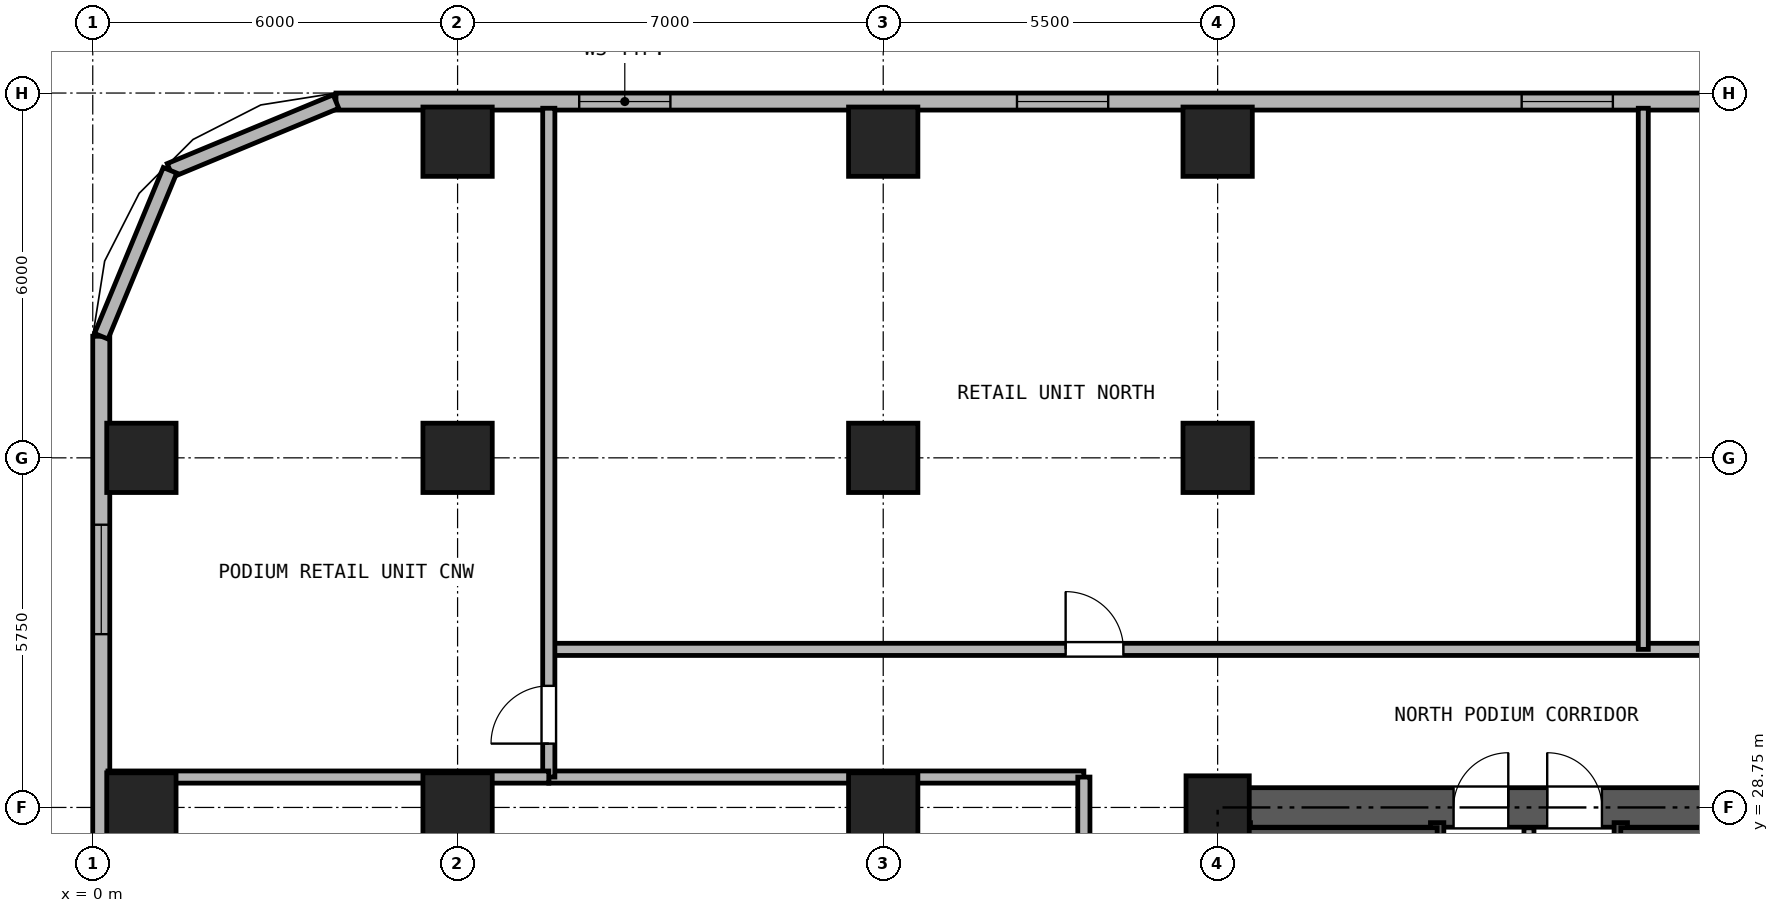
"""IFC4 building model, lengths in metres.
Left out: names, types, materials, properties, quantities, classifications, styles, units other than length and angle.
Written with IfcOpenShell. Run it as: python <this file> out.ifc"""

import sys

from ifc_helpers import new_model, si_unit, direction, frame, frame_2d, origin, origin_2d, place, context, subcontext, project, spatial, rectangle, hollow_rectangle, extrude, source, transform, mapped, element, fill, save


model = new_model("IFC4")
c1 = context("Model", 3, precision=1e-05, world=origin(), true_north=direction((0.0, 1.0)))
c2 = subcontext(c1, "Body", "Model", "MODEL_VIEW")
j1 = project(units=[si_unit("LENGTHUNIT", "METRE"), si_unit("PLANEANGLEUNIT", "RADIAN")], contexts=[c1])
p1 = place(None, origin())
s1 = spatial("IfcSite", under=j1, at=p1, CompositionType="ELEMENT")
p2 = place(p1, origin())
s2 = spatial("IfcBuilding", under=s1, at=p2, CompositionType="ELEMENT")
p3 = place(p2, frame((0.0, 0.0, 9.0)))
s3 = spatial("IfcBuildingStorey", under=s2, at=p3, CompositionType="ELEMENT", Elevation=9.0)
m1 = source(origin(), c2, "Body", "SweptSolid", [
    extrude(hollow_rectangle(XDim=1.14, YDim=1.14, WallThickness=0.07, at=origin_2d()), origin(), (0.0, 0.0, 1.0), 4.18),
])
for number, where, z_axis, x_axis in (
    (1, (6.0, 39.7, 0.0), (0.0, 0.0, 1.0), (1.0, 0.0, 0.0)),
    (2, (13.0, 39.7, 0.0), (0.0, 0.0, 1.0), (1.0, 0.0, 0.0)),
    (3, (18.5, 39.7, 0.0), (0.0, 0.0, 1.0), (1.0, 0.0, 0.0)),
    (4, (0.8, 28.75, 0.0), (0.0, 0.0, 1.0), (1.0, 0.0, 0.0)),
    (5, (0.8, 34.5, 0.0), (0.0, 0.0, 1.0), (1.0, 0.0, 0.0)),
    (6, (6.0, 28.75, 0.0), (0.0, 0.0, 1.0), (1.0, 0.0, 0.0)),
    (7, (6.0, 34.5, 0.0), (0.0, 0.0, 1.0), (1.0, 0.0, 0.0)),
    (8, (13.0, 28.75, 0.0), (0.0, 0.0, 1.0), (1.0, 0.0, 0.0)),
    (9, (13.0, 34.5, 0.0), (0.0, 0.0, 1.0), (1.0, 0.0, 0.0)),
):
    element("IfcColumn", number, at=place(p3, frame(where, z_axis=z_axis, x_axis=x_axis)), inside=s3, PredefinedType="COLUMN", context=c2, shape_type="MappedRepresentation", body=[
        mapped(m1, transform((0.0, 0.0, 0.0), x_axis=(1.0, 0.0, 0.0), y_axis=(0.0, 1.0, 0.0), z_axis=(0.0, 0.0, 1.0), scale=1.0)),
    ])
m2 = source(origin(), c2, "Body", "SweptSolid", [
    extrude(hollow_rectangle(XDim=1.04, YDim=1.04, WallThickness=0.065, at=origin_2d()), origin(), (0.0, 0.0, 1.0), 4.18),
])
p4 = place(p3, frame((18.5, 28.75, 0.0), z_axis=(0.0, 0.0, 1.0), x_axis=(1.0, 0.0, 0.0)))
e10 = element("IfcColumn", 10, at=p4, inside=s3, PredefinedType="COLUMN", context=c2, shape_type="MappedRepresentation", body=[
    mapped(m2, transform((0.0, 0.0, 0.0), x_axis=(1.0, 0.0, 0.0), y_axis=(0.0, 1.0, 0.0), z_axis=(0.0, 0.0, 1.0), scale=1.0)),
])
p5 = place(p3, frame((18.5, 34.5, 0.0), z_axis=(0.0, 0.0, 1.0), x_axis=(1.0, 0.0, 0.0)))
e11 = element("IfcColumn", 11, at=p5, inside=s3, PredefinedType="COLUMN", context=c2, shape_type="MappedRepresentation", body=[
    mapped(m1, transform((0.0, 0.0, 0.0), x_axis=(1.0, 0.0, 0.0), y_axis=(0.0, 1.0, 0.0), z_axis=(0.0, 0.0, 1.0), scale=1.0)),
])
p6 = place(p3, frame((0.14, 4.0, 0.0), z_axis=(0.0, 0.0, 1.0), x_axis=(0.0, 1.0, 0.0)))
e12 = element("IfcWall", 12, at=p6, inside=s3, PredefinedType="SOLIDWALL", context=c2, shape_type="SweptSolid", body=[
    extrude(rectangle(XDim=32.5, YDim=0.28, at=frame_2d((16.25, 0.0))), origin(), (0.0, 0.0, 1.0), 4.18),
])
p7 = place(p6, frame((3.6, 0.0, 0.9)))
e13 = element("IfcOpeningElement", 13, at=p7, cuts=e12, PredefinedType="OPENING", context=c2, shape_type="SweptSolid", body=[
    extrude(rectangle(XDim=1.8, YDim=2.1, at=frame_2d((0.9, 1.05))), frame((0.0, 0.15, 0.0), z_axis=(0.0, -1.0, 0.0), x_axis=(1.0, 0.0, 0.0)), (0.0, 0.0, 1.0), 0.3),
])
p8 = place(p6, frame((9.8, 0.0, 0.9)))
e14 = element("IfcOpeningElement", 14, at=p8, cuts=e12, PredefinedType="OPENING", context=c2, shape_type="SweptSolid", body=[
    extrude(rectangle(XDim=1.8, YDim=2.1, at=frame_2d((0.9, 1.05))), frame((0.0, 0.15, 0.0), z_axis=(0.0, -1.0, 0.0), x_axis=(1.0, 0.0, 0.0)), (0.0, 0.0, 1.0), 0.3),
])
p9 = place(p6, frame((15.8, 0.0, 0.9)))
e15 = element("IfcOpeningElement", 15, at=p9, cuts=e12, PredefinedType="OPENING", context=c2, shape_type="SweptSolid", body=[
    extrude(rectangle(XDim=1.8, YDim=2.1, at=frame_2d((0.9, 1.05))), frame((0.0, 0.15, 0.0), z_axis=(0.0, -1.0, 0.0), x_axis=(1.0, 0.0, 0.0)), (0.0, 0.0, 1.0), 0.3),
])
p10 = place(p6, frame((21.6, 0.0, 0.9)))
e16 = element("IfcOpeningElement", 16, at=p10, cuts=e12, PredefinedType="OPENING", context=c2, shape_type="SweptSolid", body=[
    extrude(rectangle(XDim=1.8, YDim=2.1, at=frame_2d((0.9, 1.05))), frame((0.0, 0.15, 0.0), z_axis=(0.0, -1.0, 0.0), x_axis=(1.0, 0.0, 0.0)), (0.0, 0.0, 1.0), 0.3),
])
p11 = place(p6, frame((27.6, 0.0, 0.9)))
e17 = element("IfcOpeningElement", 17, at=p11, cuts=e12, PredefinedType="OPENING", context=c2, shape_type="SweptSolid", body=[
    extrude(rectangle(XDim=1.8, YDim=2.1, at=frame_2d((0.9, 1.05))), frame((0.0, 0.15, 0.0), z_axis=(0.0, -1.0, 0.0), x_axis=(1.0, 0.0, 0.0)), (0.0, 0.0, 1.0), 0.3),
])
p12 = place(p3, frame((4.0, 40.36, 0.0), z_axis=(0.0, 0.0, 1.0), x_axis=(1.0, 0.0, 0.0)))
e18 = element("IfcWall", 18, at=p12, inside=s3, PredefinedType="SOLIDWALL", context=c2, shape_type="SweptSolid", body=[
    extrude(rectangle(XDim=39.0, YDim=0.28, at=frame_2d((19.5, 0.0))), origin(), (0.0, 0.0, 1.0), 4.18),
])
p13 = place(p12, frame((4.0, 0.0, 0.9)))
e19 = element("IfcOpeningElement", 19, at=p13, cuts=e18, PredefinedType="OPENING", context=c2, shape_type="SweptSolid", body=[
    extrude(rectangle(XDim=1.5, YDim=1.8, at=frame_2d((0.75, 0.9))), frame((0.0, 0.15, 0.0), z_axis=(0.0, -1.0, 0.0), x_axis=(1.0, 0.0, 0.0)), (0.0, 0.0, 1.0), 0.3),
])
p14 = place(p12, frame((11.2, 0.0, 0.9)))
e20 = element("IfcOpeningElement", 20, at=p14, cuts=e18, PredefinedType="OPENING", context=c2, shape_type="SweptSolid", body=[
    extrude(rectangle(XDim=1.5, YDim=1.8, at=frame_2d((0.75, 0.9))), frame((0.0, 0.15, 0.0), z_axis=(0.0, -1.0, 0.0), x_axis=(1.0, 0.0, 0.0)), (0.0, 0.0, 1.0), 0.3),
])
p15 = place(p12, frame((19.5, 0.0, 0.9)))
e21 = element("IfcOpeningElement", 21, at=p15, cuts=e18, PredefinedType="OPENING", context=c2, shape_type="SweptSolid", body=[
    extrude(rectangle(XDim=1.5, YDim=1.8, at=frame_2d((0.75, 0.9))), frame((0.0, 0.15, 0.0), z_axis=(0.0, -1.0, 0.0), x_axis=(1.0, 0.0, 0.0)), (0.0, 0.0, 1.0), 0.3),
])
p16 = place(p12, frame((26.2, 0.0, 0.9)))
e22 = element("IfcOpeningElement", 22, at=p16, cuts=e18, PredefinedType="OPENING", context=c2, shape_type="SweptSolid", body=[
    extrude(rectangle(XDim=1.5, YDim=1.8, at=frame_2d((0.75, 0.9))), frame((0.0, 0.15, 0.0), z_axis=(0.0, -1.0, 0.0), x_axis=(1.0, 0.0, 0.0)), (0.0, 0.0, 1.0), 0.3),
])
p17 = place(p12, frame((32.8, 0.0, 0.9)))
e23 = element("IfcOpeningElement", 23, at=p17, cuts=e18, PredefinedType="OPENING", context=c2, shape_type="SweptSolid", body=[
    extrude(rectangle(XDim=1.5, YDim=1.8, at=frame_2d((0.75, 0.9))), frame((0.0, 0.15, 0.0), z_axis=(0.0, -1.0, 0.0), x_axis=(1.0, 0.0, 0.0)), (0.0, 0.0, 1.0), 0.3),
])
for number, where, z_axis, x_axis in (
    (24, (4.0, 40.36, 0.0), (0.0, 0.0, 1.0), (-0.924, -0.383, 0.0)),
    (25, (1.271, 39.229, 0.0), (0.0, 0.0, 1.0), (-0.383, -0.924, 0.0)),
):
    element("IfcWall", number, at=place(p3, frame(where, z_axis=z_axis, x_axis=x_axis)), inside=s3, PredefinedType="SOLIDWALL", context=c2, shape_type="SweptSolid", body=[
        extrude(rectangle(XDim=2.954, YDim=0.24, at=frame_2d((1.477, 0.0))), origin(), (0.0, 0.0, 1.0), 4.18),
    ])
p18 = place(p3, frame((18.175, 28.75, 0.0), z_axis=(0.0, 0.0, 1.0), x_axis=(1.0, 0.0, 0.0)))
e26 = element("IfcWall", 26, at=p18, inside=s3, PredefinedType="SHEAR", context=c2, shape_type="SweptSolid", body=[
    extrude(rectangle(XDim=10.65, YDim=0.65, at=frame_2d((5.325, 0.0))), origin(), (0.0, 0.0, 1.0), 4.18),
])
p19 = place(p18, frame((4.205, 0.0, 0.0)))
e27 = element("IfcOpeningElement", 27, at=p19, cuts=e26, PredefinedType="OPENING", context=c2, shape_type="SweptSolid", body=[
    extrude(rectangle(XDim=0.9, YDim=2.05, at=frame_2d((0.45, 1.025))), frame((0.0, 0.335, 0.0), z_axis=(0.0, -1.0, 0.0), x_axis=(1.0, 0.0, 0.0)), (0.0, 0.0, 1.0), 0.67),
])
p20 = place(p18, frame((5.745, 0.0, 0.0)))
e28 = element("IfcOpeningElement", 28, at=p20, cuts=e26, PredefinedType="OPENING", context=c2, shape_type="SweptSolid", body=[
    extrude(rectangle(XDim=0.9, YDim=2.05, at=frame_2d((0.45, 1.025))), frame((0.0, 0.335, 0.0), z_axis=(0.0, -1.0, 0.0), x_axis=(1.0, 0.0, 0.0)), (0.0, 0.0, 1.0), 0.67),
])
p21 = place(p3, frame((18.5, 11.825, 0.0), z_axis=(0.0, 0.0, 1.0), x_axis=(0.0, 1.0, 0.0)))
e29 = element("IfcWall", 29, at=p21, inside=s3, PredefinedType="SHEAR", context=c2, shape_type="SweptSolid", body=[
    extrude(rectangle(XDim=16.6, YDim=0.65, at=frame_2d((8.3, 0.0))), origin(), (0.0, 0.0, 1.0), 4.18),
])
p22 = place(p21, frame((7.325, 0.0, 0.0)))
e30 = element("IfcOpeningElement", 30, at=p22, cuts=e29, PredefinedType="OPENING", context=c2, shape_type="SweptSolid", body=[
    extrude(rectangle(XDim=1.15, YDim=2.2, at=frame_2d((0.575, 1.1))), frame((0.0, 0.335, 0.0), z_axis=(0.0, -1.0, 0.0), x_axis=(1.0, 0.0, 0.0)), (0.0, 0.0, 1.0), 0.67),
])
for number, where, z_axis, x_axis in (
    (31, (18.93, 21.39, 0.0), (0.0, 0.0, 1.0), (0.0, 1.0, 0.0)),
    (32, (22.11, 21.39, 0.0), (0.0, 0.0, 1.0), (0.0, 1.0, 0.0)),
    (33, (25.13, 21.39, 0.0), (0.0, 0.0, 1.0), (0.0, 1.0, 0.0)),
):
    element("IfcWall", number, at=place(p3, frame(where, z_axis=z_axis, x_axis=x_axis)), inside=s3, PredefinedType="SOLIDWALL", context=c2, shape_type="SweptSolid", body=[
        extrude(rectangle(XDim=7.11, YDim=0.22, at=frame_2d((3.555, 0.0))), origin(), (0.0, 0.0, 1.0), 4.18),
    ])
p23 = place(p3, frame((18.835, 28.335, 0.0), z_axis=(0.0, 0.0, 1.0), x_axis=(1.0, 0.0, 0.0)))
e34 = element("IfcWall", 34, at=p23, inside=s3, PredefinedType="PARTITIONING", context=c2, shape_type="SweptSolid", body=[
    extrude(rectangle(XDim=3.275, YDim=0.165, at=frame_2d((1.638, 0.0))), origin(), (0.0, 0.0, 1.0), 4.18),
])
p24 = place(p3, frame((25.13, 28.335, 0.0), z_axis=(0.0, 0.0, 1.0), x_axis=(1.0, 0.0, 0.0)))
e35 = element("IfcWall", 35, at=p24, inside=s3, PredefinedType="PARTITIONING", context=c2, shape_type="SweptSolid", body=[
    extrude(rectangle(XDim=3.035, YDim=0.165, at=frame_2d((1.518, 0.0))), origin(), (0.0, 0.0, 1.0), 4.18),
])
p25 = place(p3, frame((23.62, 24.4, 0.0), z_axis=(0.0, 0.0, 1.0), x_axis=(0.0, 1.0, 0.0)))
e36 = element("IfcWall", 36, at=p25, inside=s3, PredefinedType="PARTITIONING", context=c2, shape_type="SweptSolid", body=[
    extrude(rectangle(XDim=4.015, YDim=0.165, at=frame_2d((2.008, 0.0))), origin(), (0.0, 0.0, 1.0), 4.18),
])
p26 = place(p3, frame((7.5, 31.35, 0.0), z_axis=(0.0, 0.0, 1.0), x_axis=(1.0, 0.0, 0.0)))
e37 = element("IfcWall", 37, at=p26, inside=s3, PredefinedType="PARTITIONING", context=c2, shape_type="SweptSolid", body=[
    extrude(rectangle(XDim=32.0, YDim=0.2, at=frame_2d((16.0, 0.0))), origin(), (0.0, 0.0, 1.0), 4.18),
])
p27 = place(p26, frame((8.5, 0.0, 0.0)))
e38 = element("IfcOpeningElement", 38, at=p27, cuts=e37, PredefinedType="OPENING", context=c2, shape_type="SweptSolid", body=[
    extrude(rectangle(XDim=0.95, YDim=2.15, at=frame_2d((0.475, 1.075))), frame((0.0, 0.11, 0.0), z_axis=(0.0, -1.0, 0.0), x_axis=(1.0, 0.0, 0.0)), (0.0, 0.0, 1.0), 0.22),
])
p28 = place(p26, frame((24.5, 0.0, 0.0)))
e39 = element("IfcOpeningElement", 39, at=p28, cuts=e37, PredefinedType="OPENING", context=c2, shape_type="SweptSolid", body=[
    extrude(rectangle(XDim=0.95, YDim=2.15, at=frame_2d((0.475, 1.075))), frame((0.0, 0.11, 0.0), z_axis=(0.0, -1.0, 0.0), x_axis=(1.0, 0.0, 0.0)), (0.0, 0.0, 1.0), 0.22),
])
p29 = place(p3, frame((7.5, 29.25, 0.0), z_axis=(0.0, 0.0, 1.0), x_axis=(1.0, 0.0, 0.0)))
e40 = element("IfcWall", 40, at=p29, inside=s3, PredefinedType="PARTITIONING", context=c2, shape_type="SweptSolid", body=[
    extrude(rectangle(XDim=8.8, YDim=0.2, at=frame_2d((4.4, 0.0))), origin(), (0.0, 0.0, 1.0), 4.18),
])
p30 = place(p3, frame((16.3, 11.0, 0.0), z_axis=(0.0, 0.0, 1.0), x_axis=(0.0, 1.0, 0.0)))
e41 = element("IfcWall", 41, at=p30, inside=s3, PredefinedType="PARTITIONING", context=c2, shape_type="SweptSolid", body=[
    extrude(rectangle(XDim=18.25, YDim=0.2, at=frame_2d((9.125, 0.0))), origin(), (0.0, 0.0, 1.0), 4.18),
])
p31 = place(p30, frame((4.25, 0.0, 0.0)))
e42 = element("IfcOpeningElement", 42, at=p31, cuts=e41, PredefinedType="OPENING", context=c2, shape_type="SweptSolid", body=[
    extrude(rectangle(XDim=0.95, YDim=2.15, at=frame_2d((0.475, 1.075))), frame((0.0, 0.11, 0.0), z_axis=(0.0, -1.0, 0.0), x_axis=(1.0, 0.0, 0.0)), (0.0, 0.0, 1.0), 0.22),
])
p32 = place(p30, frame((13.375, 0.0, 0.0)))
e43 = element("IfcOpeningElement", 43, at=p32, cuts=e41, PredefinedType="OPENING", context=c2, shape_type="SweptSolid", body=[
    extrude(rectangle(XDim=0.95, YDim=2.15, at=frame_2d((0.475, 1.075))), frame((0.0, 0.11, 0.0), z_axis=(0.0, -1.0, 0.0), x_axis=(1.0, 0.0, 0.0)), (0.0, 0.0, 1.0), 0.22),
])
p33 = place(p3, frame((7.5, 29.25, 0.0), z_axis=(0.0, 0.0, 1.0), x_axis=(0.0, 1.0, 0.0)))
e44 = element("IfcWall", 44, at=p33, inside=s3, PredefinedType="PARTITIONING", context=c2, shape_type="SweptSolid", body=[
    extrude(rectangle(XDim=11.0, YDim=0.2, at=frame_2d((5.5, 0.0))), origin(), (0.0, 0.0, 1.0), 4.18),
])
p34 = place(p33, frame((0.55, 0.0, 0.0)))
e45 = element("IfcOpeningElement", 45, at=p34, cuts=e44, PredefinedType="OPENING", context=c2, shape_type="SweptSolid", body=[
    extrude(rectangle(XDim=0.95, YDim=2.15, at=frame_2d((0.475, 1.075))), frame((0.0, 0.11, 0.0), z_axis=(0.0, -1.0, 0.0), x_axis=(1.0, 0.0, 0.0)), (0.0, 0.0, 1.0), 0.22),
])
p35 = place(p3, frame((0.25, 29.25, 0.0), z_axis=(0.0, 0.0, 1.0), x_axis=(1.0, 0.0, 0.0)))
e46 = element("IfcWall", 46, at=p35, inside=s3, PredefinedType="PARTITIONING", context=c2, shape_type="SweptSolid", body=[
    extrude(rectangle(XDim=7.25, YDim=0.2, at=frame_2d((3.625, 0.0))), origin(), (0.0, 0.0, 1.0), 4.18),
])
p36 = place(p3, frame((25.5, 31.35, 0.0), z_axis=(0.0, 0.0, 1.0), x_axis=(0.0, 1.0, 0.0)))
e47 = element("IfcWall", 47, at=p36, inside=s3, PredefinedType="PARTITIONING", context=c2, shape_type="SweptSolid", body=[
    extrude(rectangle(XDim=8.9, YDim=0.165, at=frame_2d((4.45, 0.0))), origin(), (0.0, 0.0, 1.0), 4.18),
])
p37 = place(p11, origin())
e48 = element("IfcWindow", 48, at=p37, inside=s3, PartitioningType="SINGLE_PANEL", PredefinedType="WINDOW", context=c2, shape_type="SweptSolid", body=[
    extrude(rectangle(XDim=1.8, YDim=2.1, at=frame_2d((0.9, 1.05))), frame((0.0, 0.03, 0.0), z_axis=(0.0, -1.0, 0.0), x_axis=(1.0, 0.0, 0.0)), (0.0, 0.0, 1.0), 0.06),
])
fill(e17, e48)
p38 = place(p13, origin())
e49 = element("IfcWindow", 49, at=p38, inside=s3, PartitioningType="SINGLE_PANEL", PredefinedType="WINDOW", context=c2, shape_type="SweptSolid", body=[
    extrude(rectangle(XDim=1.5, YDim=1.8, at=frame_2d((0.75, 0.9))), frame((0.0, 0.03, 0.0), z_axis=(0.0, -1.0, 0.0), x_axis=(1.0, 0.0, 0.0)), (0.0, 0.0, 1.0), 0.06),
])
fill(e19, e49)
p39 = place(p14, origin())
e50 = element("IfcWindow", 50, at=p39, inside=s3, PartitioningType="SINGLE_PANEL", PredefinedType="WINDOW", context=c2, shape_type="SweptSolid", body=[
    extrude(rectangle(XDim=1.5, YDim=1.8, at=frame_2d((0.75, 0.9))), frame((0.0, 0.03, 0.0), z_axis=(0.0, -1.0, 0.0), x_axis=(1.0, 0.0, 0.0)), (0.0, 0.0, 1.0), 0.06),
])
fill(e20, e50)
p40 = place(p15, origin())
e51 = element("IfcWindow", 51, at=p40, inside=s3, PartitioningType="SINGLE_PANEL", PredefinedType="WINDOW", context=c2, shape_type="SweptSolid", body=[
    extrude(rectangle(XDim=1.5, YDim=1.8, at=frame_2d((0.75, 0.9))), frame((0.0, 0.03, 0.0), z_axis=(0.0, -1.0, 0.0), x_axis=(1.0, 0.0, 0.0)), (0.0, 0.0, 1.0), 0.06),
])
fill(e21, e51)
p41 = place(p19, origin())
e52 = element("IfcDoor", 52, at=p41, inside=s3, OperationType="SINGLE_SWING_RIGHT", PredefinedType="DOOR", context=c2, shape_type="SweptSolid", body=[
    extrude(rectangle(XDim=0.9, YDim=2.05, at=frame_2d((0.45, 1.025))), frame((0.0, 0.025, 0.0), z_axis=(0.0, -1.0, 0.0), x_axis=(1.0, 0.0, 0.0)), (0.0, 0.0, 1.0), 0.05),
])
fill(e27, e52)
p42 = place(p20, origin())
e53 = element("IfcDoor", 53, at=p42, inside=s3, OperationType="SINGLE_SWING_LEFT", PredefinedType="DOOR", context=c2, shape_type="SweptSolid", body=[
    extrude(rectangle(XDim=0.9, YDim=2.05, at=frame_2d((0.45, 1.025))), frame((0.0, 0.025, 0.0), z_axis=(0.0, -1.0, 0.0), x_axis=(1.0, 0.0, 0.0)), (0.0, 0.0, 1.0), 0.05),
])
fill(e28, e53)
p43 = place(p27, origin())
e54 = element("IfcDoor", 54, at=p43, inside=s3, OperationType="SINGLE_SWING_LEFT", PredefinedType="DOOR", context=c2, shape_type="SweptSolid", body=[
    extrude(rectangle(XDim=0.95, YDim=2.15, at=frame_2d((0.475, 1.075))), frame((0.0, 0.025, 0.0), z_axis=(0.0, -1.0, 0.0), x_axis=(1.0, 0.0, 0.0)), (0.0, 0.0, 1.0), 0.05),
])
fill(e38, e54)
p44 = place(p34, frame((0.95, 0.0, 0.0), z_axis=(0.0, 0.0, 1.0), x_axis=(-1.0, 0.0, 0.0)))
e55 = element("IfcDoor", 55, at=p44, inside=s3, OperationType="SINGLE_SWING_LEFT", PredefinedType="DOOR", context=c2, shape_type="SweptSolid", body=[
    extrude(rectangle(XDim=0.95, YDim=2.15, at=frame_2d((0.475, 1.075))), frame((0.0, 0.025, 0.0), z_axis=(0.0, -1.0, 0.0), x_axis=(1.0, 0.0, 0.0)), (0.0, 0.0, 1.0), 0.05),
])
fill(e45, e55)
save(model, sys.argv[1])
